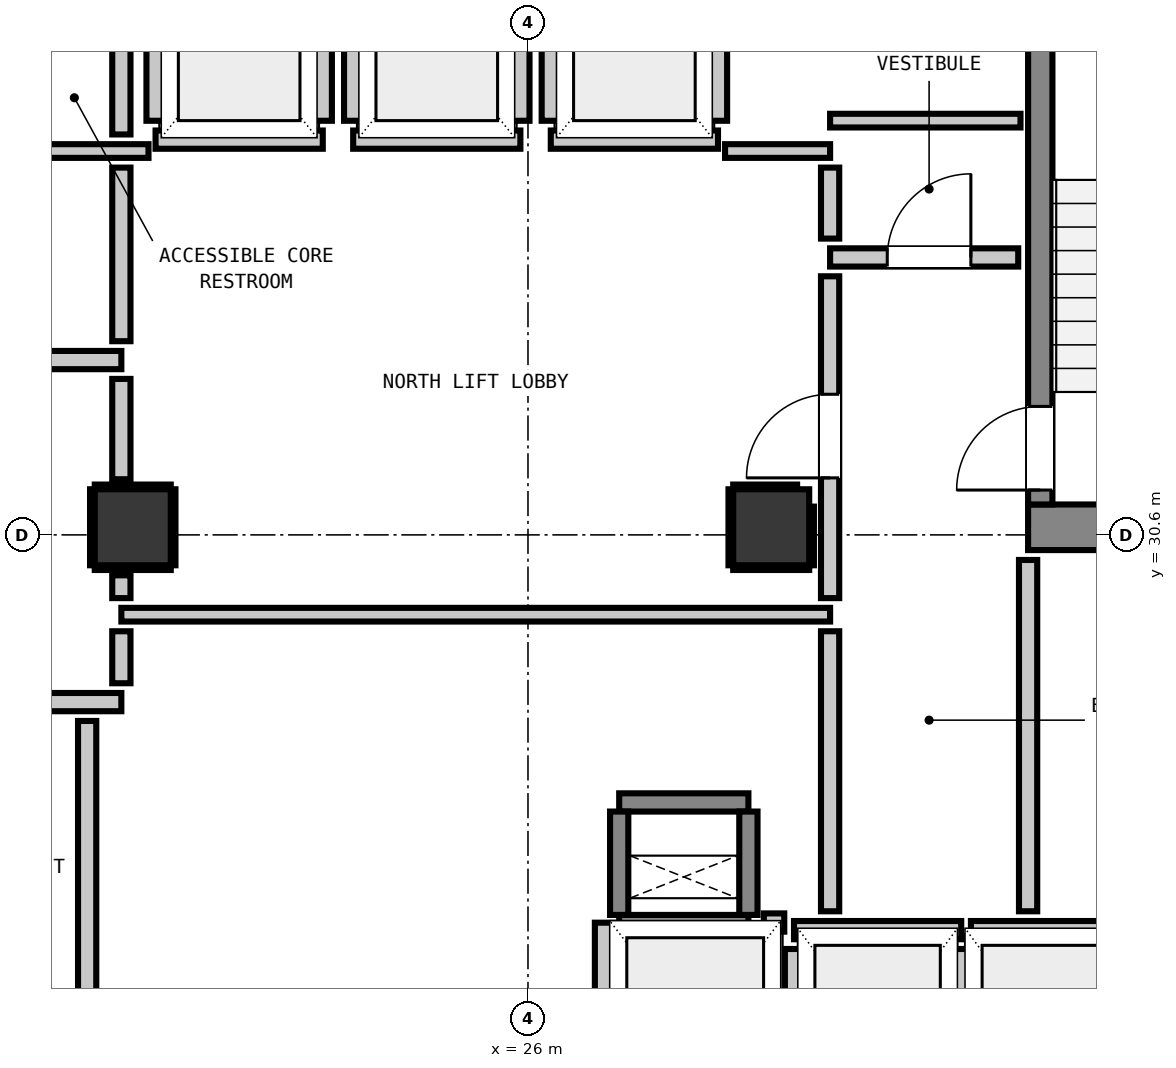
"""IFC4 building model, lengths in metres.
Left out: names, types, materials, properties, quantities, classifications, styles, units other than length and angle.
Written with IfcOpenShell. Run it as: python <this file> out.ifc"""

import sys

from ifc_helpers import new_model, si_unit, direction, frame, frame_2d, origin, origin_2d, place, context, subcontext, project, spatial, rectangle, extrude, element, fill, save


model = new_model("IFC4")
c1 = context("Model", 3, precision=1e-05, world=origin(), true_north=direction((0.0, 1.0)))
c2 = subcontext(c1, "Body", "Model", "MODEL_VIEW")
j1 = project(units=[si_unit("LENGTHUNIT", "METRE"), si_unit("PLANEANGLEUNIT", "RADIAN")], contexts=[c1])
p1 = place(None, origin())
s1 = spatial("IfcSite", under=j1, at=p1, CompositionType="ELEMENT")
p2 = place(p1, origin())
s2 = spatial("IfcBuilding", under=s1, at=p2, CompositionType="ELEMENT")
p3 = place(p2, frame((0.0, 0.0, 45.24)))
s3 = spatial("IfcBuildingStorey", under=s2, at=p3, CompositionType="ELEMENT", Elevation=45.24)
p4 = place(p3, frame((32.58, 30.7, 0.0), z_axis=(0.0, 0.0, 1.0), x_axis=(1.0, 0.0, 0.0)))
e1 = element("IfcWall", 1, at=p4, inside=s3, PredefinedType="SHEAR", context=c2, shape_type="SweptSolid", body=[
    extrude(rectangle(XDim=3.415, YDim=0.6, at=frame_2d((1.708, 0.0))), origin(), (0.0, 0.0, 1.0), 3.32),
])
p5 = place(p3, frame((32.74, 31.0, 0.0), z_axis=(0.0, 0.0, 1.0), x_axis=(0.0, 1.0, 0.0)))
e2 = element("IfcWall", 2, at=p5, inside=s3, PredefinedType="SHEAR", context=c2, shape_type="SweptSolid", body=[
    extrude(rectangle(XDim=7.8, YDim=0.32, at=frame_2d((3.9, 0.0))), origin(), (0.0, 0.0, 1.0), 3.32),
])
p6 = place(p5, frame((0.19, 0.0, 0.0)))
e3 = element("IfcOpeningElement", 3, at=p6, cuts=e2, PredefinedType="OPENING", context=c2, shape_type="SweptSolid", body=[
    extrude(rectangle(XDim=1.1, YDim=2.15, at=frame_2d((0.55, 1.075))), frame((0.0, 0.17, 0.0), z_axis=(0.0, -1.0, 0.0), x_axis=(1.0, 0.0, 0.0)), (0.0, 0.0, 1.0), 0.34),
])
for number, where, z_axis, x_axis in (
    (4, (27.2, 25.48, 0.0), (0.0, 0.0, 1.0), (1.0, 0.0, 0.0)),
    (5, (27.2, 27.08, 0.0), (0.0, 0.0, 1.0), (1.0, 0.0, 0.0)),
):
    element("IfcWall", number, at=place(p3, frame(where, z_axis=z_axis, x_axis=x_axis)), inside=s3, PredefinedType="SHEAR", context=c2, shape_type="SweptSolid", body=[
        extrude(rectangle(XDim=1.7, YDim=0.24, at=frame_2d((0.85, 0.0))), origin(), (0.0, 0.0, 1.0), 3.32),
    ])
for number, where, z_axis, x_axis in (
    (6, (27.2, 25.6, 0.0), (0.0, 0.0, 1.0), (0.0, 1.0, 0.0)),
    (7, (28.9, 25.6, 0.0), (0.0, 0.0, 1.0), (0.0, 1.0, 0.0)),
):
    element("IfcWall", number, at=place(p3, frame(where, z_axis=z_axis, x_axis=x_axis)), inside=s3, PredefinedType="SHEAR", context=c2, shape_type="SweptSolid", body=[
        extrude(rectangle(XDim=1.36, YDim=0.24, at=frame_2d((0.68, 0.0))), origin(), (0.0, 0.0, 1.0), 3.32),
    ])
for number, where, z_axis, x_axis in (
    (8, (20.8, 30.7, 0.0), (0.0, 0.0, 1.0), (1.0, 0.0, 0.0)),
    (9, (29.2, 30.7, 0.0), (0.0, 0.0, 1.0), (1.0, 0.0, 0.0)),
):
    element("IfcColumn", number, at=place(p3, frame(where, z_axis=z_axis, x_axis=x_axis)), inside=s3, PredefinedType="COLUMN", context=c2, shape_type="SweptSolid", body=[
        extrude(rectangle(XDim=1.0, YDim=1.0, at=origin_2d()), origin(), (0.0, 0.0, 1.0), 3.32),
    ])
p7 = place(p3, frame((21.1, 35.8, 0.0), z_axis=(0.0, 0.0, 1.0), x_axis=(1.0, 0.0, 0.0)))
e10 = element("IfcWall", 10, at=p7, inside=s3, PredefinedType="PARTITIONING", context=c2, shape_type="SweptSolid", body=[
    extrude(rectangle(XDim=2.2, YDim=0.24, at=frame_2d((1.1, 0.0))), origin(), (0.0, 0.0, 1.0), 3.06),
])
p8 = place(p3, frame((21.1, 36.048, 0.0), z_axis=(0.0, 0.0, 1.0), x_axis=(0.0, 1.0, 0.0)))
e11 = element("IfcWall", 11, at=p8, inside=s3, PredefinedType="PARTITIONING", context=c2, shape_type="SweptSolid", body=[
    extrude(rectangle(XDim=2.104, YDim=0.24, at=frame_2d((1.052, 0.0))), origin(), (0.0, 0.0, 1.0), 2.295),
])
p9 = place(p3, frame((23.3, 36.048, 0.0), z_axis=(0.0, 0.0, 1.0), x_axis=(0.0, 1.0, 0.0)))
e12 = element("IfcWall", 12, at=p9, inside=s3, PredefinedType="PARTITIONING", context=c2, shape_type="SweptSolid", body=[
    extrude(rectangle(XDim=2.104, YDim=0.24, at=frame_2d((1.052, 0.0))), origin(), (0.0, 0.0, 1.0), 3.06),
])
p10 = place(p3, frame((23.7, 35.8, 0.0), z_axis=(0.0, 0.0, 1.0), x_axis=(1.0, 0.0, 0.0)))
e13 = element("IfcWall", 13, at=p10, inside=s3, PredefinedType="PARTITIONING", context=c2, shape_type="SweptSolid", body=[
    extrude(rectangle(XDim=2.2, YDim=0.24, at=frame_2d((1.1, 0.0))), origin(), (0.0, 0.0, 1.0), 3.06),
])
for number, where, z_axis, x_axis in (
    (14, (23.7, 36.048, 0.0), (0.0, 0.0, 1.0), (0.0, 1.0, 0.0)),
    (15, (25.9, 36.048, 0.0), (0.0, 0.0, 1.0), (0.0, 1.0, 0.0)),
):
    element("IfcWall", number, at=place(p3, frame(where, z_axis=z_axis, x_axis=x_axis)), inside=s3, PredefinedType="PARTITIONING", context=c2, shape_type="SweptSolid", body=[
        extrude(rectangle(XDim=2.104, YDim=0.24, at=frame_2d((1.052, 0.0))), origin(), (0.0, 0.0, 1.0), 3.06),
    ])
p11 = place(p3, frame((26.3, 35.8, 0.0), z_axis=(0.0, 0.0, 1.0), x_axis=(1.0, 0.0, 0.0)))
e16 = element("IfcWall", 16, at=p11, inside=s3, PredefinedType="PARTITIONING", context=c2, shape_type="SweptSolid", body=[
    extrude(rectangle(XDim=2.2, YDim=0.24, at=frame_2d((1.1, 0.0))), origin(), (0.0, 0.0, 1.0), 3.06),
])
for number, where, z_axis, x_axis in (
    (17, (26.3, 36.048, 0.0), (0.0, 0.0, 1.0), (0.0, 1.0, 0.0)),
    (18, (28.5, 36.048, 0.0), (0.0, 0.0, 1.0), (0.0, 1.0, 0.0)),
):
    element("IfcWall", number, at=place(p3, frame(where, z_axis=z_axis, x_axis=x_axis)), inside=s3, PredefinedType="PARTITIONING", context=c2, shape_type="SweptSolid", body=[
        extrude(rectangle(XDim=2.104, YDim=0.24, at=frame_2d((1.052, 0.0))), origin(), (0.0, 0.0, 1.0), 3.06),
    ])
p12 = place(p3, frame((29.5, 25.4, 0.0), z_axis=(0.0, 0.0, 1.0), x_axis=(1.0, 0.0, 0.0)))
e19 = element("IfcWall", 19, at=p12, inside=s3, PredefinedType="PARTITIONING", context=c2, shape_type="SweptSolid", body=[
    extrude(rectangle(XDim=2.2, YDim=0.24, at=frame_2d((1.1, 0.0))), origin(), (0.0, 0.0, 1.0), 3.06),
])
p13 = place(p3, frame((29.5, 22.632, 0.0), z_axis=(0.0, 0.0, 1.0), x_axis=(0.0, 1.0, 0.0)))
e20 = element("IfcWall", 20, at=p13, inside=s3, PredefinedType="PARTITIONING", context=c2, shape_type="SweptSolid", body=[
    extrude(rectangle(XDim=2.52, YDim=0.24, at=frame_2d((1.26, 0.0))), origin(), (0.0, 0.0, 1.0), 2.295),
])
p14 = place(p3, frame((31.7, 22.73, 0.0), z_axis=(0.0, 0.0, 1.0), x_axis=(0.0, 1.0, 0.0)))
e21 = element("IfcWall", 21, at=p14, inside=s3, PredefinedType="PARTITIONING", context=c2, shape_type="SweptSolid", body=[
    extrude(rectangle(XDim=2.422, YDim=0.24, at=frame_2d((1.211, 0.0))), origin(), (0.0, 0.0, 1.0), 3.06),
])
p15 = place(p3, frame((31.828, 25.4, 0.0), z_axis=(0.0, 0.0, 1.0), x_axis=(1.0, 0.0, 0.0)))
e22 = element("IfcWall", 22, at=p15, inside=s3, PredefinedType="PARTITIONING", context=c2, shape_type="SweptSolid", body=[
    extrude(rectangle(XDim=2.072, YDim=0.24, at=frame_2d((1.036, 0.0))), origin(), (0.0, 0.0, 1.0), 3.06),
])
p16 = place(p3, frame((29.103, 25.5, 0.0), z_axis=(0.0, 0.0, 1.0), x_axis=(1.0, 0.0, 0.0)))
e23 = element("IfcWall", 23, at=p16, inside=s3, PredefinedType="PARTITIONING", context=c2, shape_type="SweptSolid", body=[
    extrude(rectangle(XDim=0.269, YDim=0.24, at=frame_2d((0.135, 0.0))), origin(), (0.0, 0.0, 1.0), 3.06),
])
p17 = place(p3, frame((27.0, 22.73, 0.0), z_axis=(0.0, 0.0, 1.0), x_axis=(0.0, 1.0, 0.0)))
e24 = element("IfcWall", 24, at=p17, inside=s3, PredefinedType="PARTITIONING", context=c2, shape_type="SweptSolid", body=[
    extrude(rectangle(XDim=2.768, YDim=0.24, at=frame_2d((1.384, 0.0))), origin(), (0.0, 0.0, 1.0), 3.06),
])
p18 = place(p3, frame((17.45, 28.4, 0.0), z_axis=(0.0, 0.0, 1.0), x_axis=(1.0, 0.0, 0.0)))
e25 = element("IfcWall", 25, at=p18, inside=s3, PredefinedType="PARTITIONING", context=c2, shape_type="SweptSolid", body=[
    extrude(rectangle(XDim=3.2, YDim=0.24, at=frame_2d((1.6, 0.0))), origin(), (0.0, 0.0, 1.0), 3.06),
])
p19 = place(p18, frame((0.784, 0.0, 0.0)))
e26 = element("IfcOpeningElement", 26, at=p19, cuts=e25, PredefinedType="OPENING", context=c2, shape_type="SweptSolid", body=[
    extrude(rectangle(XDim=1.1, YDim=2.15, at=frame_2d((0.55, 1.075))), frame((0.0, 0.13, 0.0), z_axis=(0.0, -1.0, 0.0), x_axis=(1.0, 0.0, 0.0)), (0.0, 0.0, 1.0), 0.26),
])
p20 = place(p3, frame((17.45, 32.9, 0.0), z_axis=(0.0, 0.0, 1.0), x_axis=(1.0, 0.0, 0.0)))
e27 = element("IfcWall", 27, at=p20, inside=s3, PredefinedType="PARTITIONING", context=c2, shape_type="SweptSolid", body=[
    extrude(rectangle(XDim=3.2, YDim=0.24, at=frame_2d((1.6, 0.0))), origin(), (0.0, 0.0, 1.0), 3.06),
])
p21 = place(p20, frame((0.159, 0.0, 0.0)))
e28 = element("IfcOpeningElement", 28, at=p21, cuts=e27, PredefinedType="OPENING", context=c2, shape_type="SweptSolid", body=[
    extrude(rectangle(XDim=1.1, YDim=2.15, at=frame_2d((0.55, 1.075))), frame((0.0, 0.13, 0.0), z_axis=(0.0, -1.0, 0.0), x_axis=(1.0, 0.0, 0.0)), (0.0, 0.0, 1.0), 0.26),
])
p22 = place(p3, frame((29.975, 34.25, 0.0), z_axis=(0.0, 0.0, 1.0), x_axis=(1.0, 0.0, 0.0)))
e29 = element("IfcWall", 29, at=p22, inside=s3, PredefinedType="PARTITIONING", context=c2, shape_type="SweptSolid", body=[
    extrude(rectangle(XDim=2.475, YDim=0.24, at=frame_2d((1.237, 0.0))), origin(), (0.0, 0.0, 1.0), 3.06),
])
p23 = place(p22, frame((0.752, 0.0, 0.0)))
e30 = element("IfcOpeningElement", 30, at=p23, cuts=e29, PredefinedType="OPENING", context=c2, shape_type="SweptSolid", body=[
    extrude(rectangle(XDim=1.1, YDim=2.15, at=frame_2d((0.55, 1.075))), frame((0.0, 0.13, 0.0), z_axis=(0.0, -1.0, 0.0), x_axis=(1.0, 0.0, 0.0)), (0.0, 0.0, 1.0), 0.26),
])
p24 = place(p3, frame((20.65, 29.55, 0.0), z_axis=(0.0, 0.0, 1.0), x_axis=(1.0, 0.0, 0.0)))
e31 = element("IfcWall", 31, at=p24, inside=s3, PredefinedType="PARTITIONING", context=c2, shape_type="SweptSolid", body=[
    extrude(rectangle(XDim=9.325, YDim=0.18, at=frame_2d((4.663, 0.0))), origin(), (0.0, 0.0, 1.0), 3.06),
])
p25 = place(p3, frame((18.95, 35.65, 0.0), z_axis=(0.0, 0.0, 1.0), x_axis=(1.0, 0.0, 0.0)))
e32 = element("IfcWall", 32, at=p25, inside=s3, PredefinedType="PARTITIONING", context=c2, shape_type="SweptSolid", body=[
    extrude(rectangle(XDim=2.057, YDim=0.18, at=frame_2d((1.029, 0.0))), origin(), (0.0, 0.0, 1.0), 3.06),
])
p26 = place(p3, frame((28.593, 35.65, 0.0), z_axis=(0.0, 0.0, 1.0), x_axis=(1.0, 0.0, 0.0)))
e33 = element("IfcWall", 33, at=p26, inside=s3, PredefinedType="PARTITIONING", context=c2, shape_type="SweptSolid", body=[
    extrude(rectangle(XDim=1.382, YDim=0.18, at=frame_2d((0.691, 0.0))), origin(), (0.0, 0.0, 1.0), 3.06),
])
p27 = place(p3, frame((29.975, 36.05, 0.0), z_axis=(0.0, 0.0, 1.0), x_axis=(1.0, 0.0, 0.0)))
e34 = element("IfcWall", 34, at=p27, inside=s3, PredefinedType="PARTITIONING", context=c2, shape_type="SweptSolid", body=[
    extrude(rectangle(XDim=2.505, YDim=0.18, at=frame_2d((1.252, 0.0))), origin(), (0.0, 0.0, 1.0), 3.06),
])
p28 = place(p3, frame((20.2, 22.586, 0.0), z_axis=(0.0, 0.0, 1.0), x_axis=(0.0, 1.0, 0.0)))
e35 = element("IfcWall", 35, at=p28, inside=s3, PredefinedType="PARTITIONING", context=c2, shape_type="SweptSolid", body=[
    extrude(rectangle(XDim=5.566, YDim=0.24, at=frame_2d((2.783, 0.0))), origin(), (0.0, 0.0, 1.0), 3.06),
])
p29 = place(p3, frame((20.65, 28.648, 0.0), z_axis=(0.0, 0.0, 1.0), x_axis=(0.0, 1.0, 0.0)))
e36 = element("IfcWall", 36, at=p29, inside=s3, PredefinedType="PARTITIONING", context=c2, shape_type="SweptSolid", body=[
    extrude(rectangle(XDim=0.684, YDim=0.24, at=frame_2d((0.342, 0.0))), origin(), (0.0, 0.0, 1.0), 2.295),
])
p30 = place(p3, frame((20.65, 29.768, 0.0), z_axis=(0.0, 0.0, 1.0), x_axis=(0.0, 1.0, 0.0)))
e37 = element("IfcWall", 37, at=p30, inside=s3, PredefinedType="PARTITIONING", context=c2, shape_type="SweptSolid", body=[
    extrude(rectangle(XDim=0.3, YDim=0.24, at=frame_2d((0.15, 0.0))), origin(), (0.0, 0.0, 1.0), 2.295),
])
p31 = place(p3, frame((20.65, 31.332, 0.0), z_axis=(0.0, 0.0, 1.0), x_axis=(0.0, 1.0, 0.0)))
e38 = element("IfcWall", 38, at=p31, inside=s3, PredefinedType="PARTITIONING", context=c2, shape_type="SweptSolid", body=[
    extrude(rectangle(XDim=1.32, YDim=0.24, at=frame_2d((0.66, 0.0))), origin(), (0.0, 0.0, 1.0), 2.295),
])
p32 = place(p3, frame((20.65, 33.148, 0.0), z_axis=(0.0, 0.0, 1.0), x_axis=(0.0, 1.0, 0.0)))
e39 = element("IfcWall", 39, at=p32, inside=s3, PredefinedType="PARTITIONING", context=c2, shape_type="SweptSolid", body=[
    extrude(rectangle(XDim=2.284, YDim=0.24, at=frame_2d((1.142, 0.0))), origin(), (0.0, 0.0, 1.0), 2.295),
])
p33 = place(p3, frame((20.65, 35.868, 0.0), z_axis=(0.0, 0.0, 1.0), x_axis=(0.0, 1.0, 0.0)))
e40 = element("IfcWall", 40, at=p33, inside=s3, PredefinedType="PARTITIONING", context=c2, shape_type="SweptSolid", body=[
    extrude(rectangle(XDim=2.684, YDim=0.24, at=frame_2d((1.342, 0.0))), origin(), (0.0, 0.0, 1.0), 2.295),
])
p34 = place(p3, frame((29.975, 25.648, 0.0), z_axis=(0.0, 0.0, 1.0), x_axis=(0.0, 1.0, 0.0)))
e41 = element("IfcWall", 41, at=p34, inside=s3, PredefinedType="PARTITIONING", context=c2, shape_type="SweptSolid", body=[
    extrude(rectangle(XDim=3.684, YDim=0.24, at=frame_2d((1.842, 0.0))), origin(), (0.0, 0.0, 1.0), 3.06),
])
p35 = place(p3, frame((29.975, 29.768, 0.0), z_axis=(0.0, 0.0, 1.0), x_axis=(0.0, 1.0, 0.0)))
e42 = element("IfcWall", 42, at=p35, inside=s3, PredefinedType="PARTITIONING", context=c2, shape_type="SweptSolid", body=[
    extrude(rectangle(XDim=4.234, YDim=0.24, at=frame_2d((2.117, 0.0))), origin(), (0.0, 0.0, 1.0), 3.06),
])
p36 = place(p35, frame((1.582, 0.0, 0.0)))
e43 = element("IfcOpeningElement", 43, at=p36, cuts=e42, PredefinedType="OPENING", context=c2, shape_type="SweptSolid", body=[
    extrude(rectangle(XDim=1.1, YDim=2.15, at=frame_2d((0.55, 1.075))), frame((0.0, 0.13, 0.0), z_axis=(0.0, -1.0, 0.0), x_axis=(1.0, 0.0, 0.0)), (0.0, 0.0, 1.0), 0.26),
])
p37 = place(p3, frame((29.975, 34.498, 0.0), z_axis=(0.0, 0.0, 1.0), x_axis=(0.0, 1.0, 0.0)))
e44 = element("IfcWall", 44, at=p37, inside=s3, PredefinedType="PARTITIONING", context=c2, shape_type="SweptSolid", body=[
    extrude(rectangle(XDim=0.934, YDim=0.24, at=frame_2d((0.467, 0.0))), origin(), (0.0, 0.0, 1.0), 3.06),
])
p38 = place(p3, frame((32.58, 25.648, 0.0), z_axis=(0.0, 0.0, 1.0), x_axis=(0.0, 1.0, 0.0)))
e45 = element("IfcWall", 45, at=p38, inside=s3, PredefinedType="PARTITIONING", context=c2, shape_type="SweptSolid", body=[
    extrude(rectangle(XDim=4.622, YDim=0.24, at=frame_2d((2.311, 0.0))), origin(), (0.0, 0.0, 1.0), 3.06),
])
for number, where, z_axis, x_axis in (
    (46, (20.3, 30.168, 0.0), (0.0, 0.0, 1.0), (1.0, 0.0, 0.0)),
    (47, (20.3, 31.232, 0.0), (0.0, 0.0, 1.0), (1.0, 0.0, 0.0)),
    (48, (20.268, 30.2, 0.0), (0.0, 0.0, 1.0), (0.0, 1.0, 0.0)),
    (49, (21.332, 30.2, 0.0), (0.0, 0.0, 1.0), (0.0, 1.0, 0.0)),
    (50, (28.7, 30.168, 0.0), (0.0, 0.0, 1.0), (1.0, 0.0, 0.0)),
):
    element("IfcWall", number, at=place(p3, frame(where, z_axis=z_axis, x_axis=x_axis)), inside=s3, PredefinedType="PARTITIONING", context=c2, shape_type="SweptSolid", body=[
        extrude(rectangle(XDim=1.0, YDim=0.06, at=frame_2d((0.5, 0.0))), origin(), (0.0, 0.0, 1.0), 1.45),
    ])
p39 = place(p3, frame((28.7, 31.232, 0.0), z_axis=(0.0, 0.0, 1.0), x_axis=(1.0, 0.0, 0.0)))
e51 = element("IfcWall", 51, at=p39, inside=s3, PredefinedType="PARTITIONING", context=c2, shape_type="SweptSolid", body=[
    extrude(rectangle(XDim=0.841, YDim=0.06, at=frame_2d((0.42, 0.0))), origin(), (0.0, 0.0, 1.0), 1.45),
])
p40 = place(p3, frame((28.668, 30.2, 0.0), z_axis=(0.0, 0.0, 1.0), x_axis=(0.0, 1.0, 0.0)))
e52 = element("IfcWall", 52, at=p40, inside=s3, PredefinedType="PARTITIONING", context=c2, shape_type="SweptSolid", body=[
    extrude(rectangle(XDim=1.0, YDim=0.06, at=frame_2d((0.5, 0.0))), origin(), (0.0, 0.0, 1.0), 1.45),
])
p41 = place(p3, frame((29.732, 30.2, 0.0), z_axis=(0.0, 0.0, 1.0), x_axis=(0.0, 1.0, 0.0)))
e53 = element("IfcWall", 53, at=p41, inside=s3, PredefinedType="PARTITIONING", context=c2, shape_type="SweptSolid", body=[
    extrude(rectangle(XDim=0.772, YDim=0.06, at=frame_2d((0.386, 0.0))), origin(), (0.0, 0.0, 1.0), 1.45),
])
p42 = place(p6, origin())
e54 = element("IfcDoor", 54, at=p42, inside=s3, OperationType="SINGLE_SWING_LEFT", PredefinedType="DOOR", context=c2, shape_type="SweptSolid", body=[
    extrude(rectangle(XDim=1.1, YDim=2.15, at=frame_2d((0.55, 1.075))), frame((0.0, 0.025, 0.0), z_axis=(0.0, -1.0, 0.0), x_axis=(1.0, 0.0, 0.0)), (0.0, 0.0, 1.0), 0.05),
])
fill(e3, e54)
p43 = place(p36, origin())
e55 = element("IfcDoor", 55, at=p43, inside=s3, OperationType="SINGLE_SWING_LEFT", PredefinedType="DOOR", context=c2, shape_type="SweptSolid", body=[
    extrude(rectangle(XDim=1.1, YDim=2.15, at=frame_2d((0.55, 1.075))), frame((0.0, 0.025, 0.0), z_axis=(0.0, -1.0, 0.0), x_axis=(1.0, 0.0, 0.0)), (0.0, 0.0, 1.0), 0.05),
])
fill(e43, e55)
p44 = place(p23, origin())
e56 = element("IfcDoor", 56, at=p44, inside=s3, OperationType="SINGLE_SWING_RIGHT", PredefinedType="DOOR", context=c2, shape_type="SweptSolid", body=[
    extrude(rectangle(XDim=1.1, YDim=2.15, at=frame_2d((0.55, 1.075))), frame((0.0, 0.025, 0.0), z_axis=(0.0, -1.0, 0.0), x_axis=(1.0, 0.0, 0.0)), (0.0, 0.0, 1.0), 0.05),
])
fill(e30, e56)
save(model, sys.argv[1])
